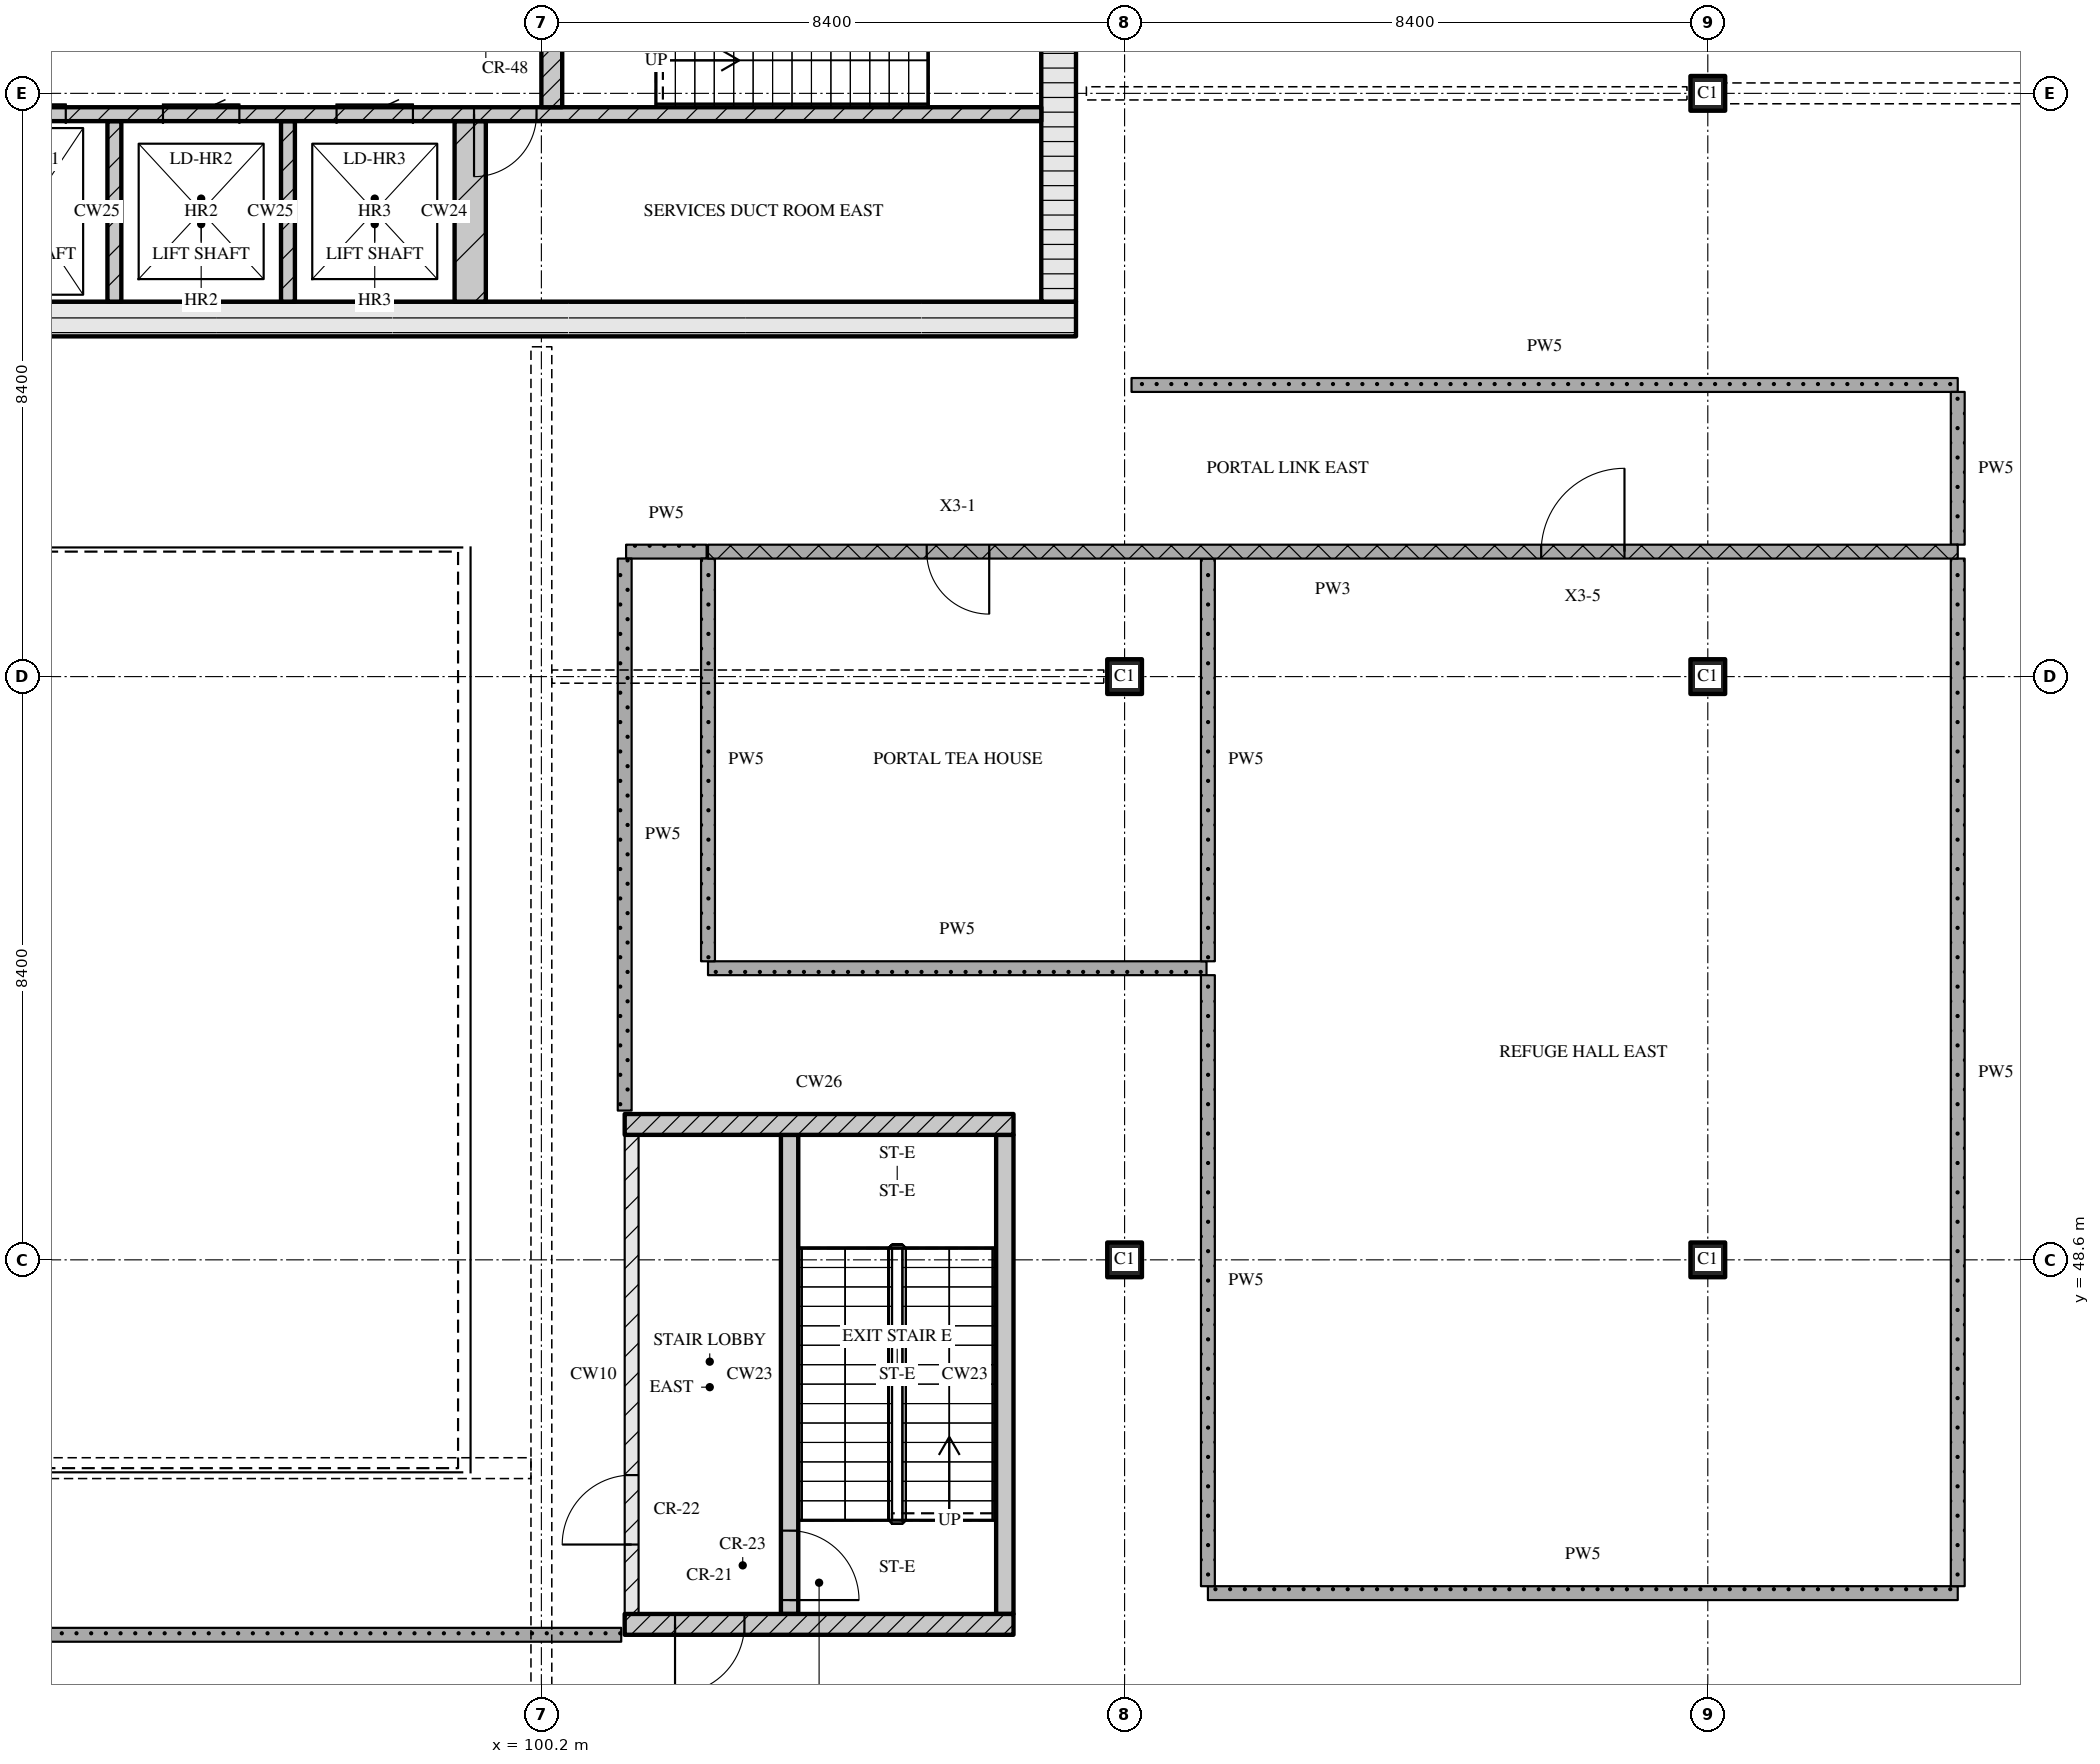
"""IFC4 building model, lengths in metres.
Left out: names, types, materials, properties, quantities, classifications, styles, units other than length and angle.
Written with IfcOpenShell. Run it as: python <this file> out.ifc"""

import sys

from ifc_helpers import new_model, si_unit, direction, frame, frame_2d, origin, origin_2d, place, context, subcontext, project, spatial, rectangle, extrude, element, fill, save


model = new_model("IFC4")
c1 = context("Model", 3, precision=1e-05, world=origin(), true_north=direction((0.0, 1.0)))
c2 = subcontext(c1, "Body", "Model", "MODEL_VIEW")
j1 = project(units=[si_unit("LENGTHUNIT", "METRE"), si_unit("PLANEANGLEUNIT", "RADIAN")], contexts=[c1])
p1 = place(None, origin())
s1 = spatial("IfcSite", under=j1, at=p1, CompositionType="ELEMENT")
p2 = place(p1, origin())
s2 = spatial("IfcBuilding", under=s1, at=p2, CompositionType="ELEMENT")
p3 = place(p2, frame((0.0, 0.0, 252.3)))
s3 = spatial("IfcBuildingStorey", under=s2, at=p3, CompositionType="ELEMENT", Elevation=252.3)
for number, where, z_axis, x_axis in (
    (1, (108.6, 48.6, 0.0), (0.0, 0.0, 1.0), (1.0, 0.0, 0.0)),
    (2, (108.6, 57.0, 0.0), (0.0, 0.0, 1.0), (1.0, 0.0, 0.0)),
    (3, (117.0, 48.6, 0.0), (0.0, 0.0, 1.0), (1.0, 0.0, 0.0)),
    (4, (117.0, 57.0, 0.0), (0.0, 0.0, 1.0), (1.0, 0.0, 0.0)),
    (5, (117.0, 65.4, 0.0), (0.0, 0.0, 1.0), (1.0, 0.0, 0.0)),
):
    element("IfcColumn", number, at=place(p3, frame(where, z_axis=z_axis, x_axis=x_axis)), inside=s3, PredefinedType="COLUMN", context=c2, shape_type="SweptSolid", body=[
        extrude(rectangle(XDim=0.5, YDim=0.5, at=origin_2d()), origin(), (0.0, 0.0, 1.0), 11.25),
    ])
p4 = place(p3, frame((67.3, 62.15, 0.0), z_axis=(0.0, 0.0, 1.0), x_axis=(1.0, 0.0, 0.0)))
e6 = element("IfcWall", 6, at=p4, inside=s3, PredefinedType="SOLIDWALL", context=c2, shape_type="SweptSolid", body=[
    extrude(rectangle(XDim=40.6, YDim=0.5, at=frame_2d((20.3, 0.0))), origin(), (0.0, 0.0, 1.0), 10.97),
])
p5 = place(p4, frame((20.65, 0.0, 0.0)))
e7 = element("IfcOpeningElement", 7, at=p5, cuts=e6, PredefinedType="OPENING", context=c2, shape_type="SweptSolid", body=[
    extrude(rectangle(XDim=1.8, YDim=2.1, at=frame_2d((0.9, 1.05))), frame((0.0, 0.26, 0.0), z_axis=(0.0, -1.0, 0.0), x_axis=(1.0, 0.0, 0.0)), (0.0, 0.0, 1.0), 0.52),
])
p6 = place(p3, frame((107.65, 62.4, 0.0), z_axis=(0.0, 0.0, 1.0), x_axis=(0.0, 1.0, 0.0)))
e8 = element("IfcWall", 8, at=p6, inside=s3, PredefinedType="SOLIDWALL", context=c2, shape_type="SweptSolid", body=[
    extrude(rectangle(XDim=12.0, YDim=0.5, at=frame_2d((6.0, 0.0))), origin(), (0.0, 0.0, 1.0), 10.97),
])
p7 = place(p6, frame((6.45, 0.0, 0.0)))
e9 = element("IfcOpeningElement", 9, at=p7, cuts=e8, PredefinedType="OPENING", context=c2, shape_type="SweptSolid", body=[
    extrude(rectangle(XDim=1.2, YDim=2.1, at=frame_2d((0.6, 1.05))), frame((0.0, 0.26, 0.0), z_axis=(0.0, -1.0, 0.0), x_axis=(1.0, 0.0, 0.0)), (0.0, 0.0, 1.0), 0.52),
])
for number, where, z_axis, x_axis in (
    (10, (94.05, 62.4, 0.0), (0.0, 0.0, 1.0), (0.0, 1.0, 0.0)),
    (11, (96.55, 62.4, 0.0), (0.0, 0.0, 1.0), (0.0, 1.0, 0.0)),
):
    element("IfcWall", number, at=place(p3, frame(where, z_axis=z_axis, x_axis=x_axis)), inside=s3, PredefinedType="SOLIDWALL", context=c2, shape_type="SweptSolid", body=[
        extrude(rectangle(XDim=2.6, YDim=0.2, at=frame_2d((1.3, 0.0))), origin(), (0.0, 0.0, 1.0), 10.97),
    ])
p8 = place(p3, frame((99.175, 62.4, 0.0), z_axis=(0.0, 0.0, 1.0), x_axis=(0.0, 1.0, 0.0)))
e12 = element("IfcWall", 12, at=p8, inside=s3, PredefinedType="SOLIDWALL", context=c2, shape_type="SweptSolid", body=[
    extrude(rectangle(XDim=2.6, YDim=0.45, at=frame_2d((1.3, 0.0))), origin(), (0.0, 0.0, 1.0), 10.97),
])
p9 = place(p3, frame((91.4, 65.1, 0.0), z_axis=(0.0, 0.0, 1.0), x_axis=(1.0, 0.0, 0.0)))
e13 = element("IfcWall", 13, at=p9, inside=s3, PredefinedType="SOLIDWALL", context=c2, shape_type="SweptSolid", body=[
    extrude(rectangle(XDim=16.0, YDim=0.2, at=frame_2d((8.0, 0.0))), origin(), (0.0, 0.0, 1.0), 10.97),
])
p10 = place(p9, frame((0.85, 0.0, 0.0)))
e14 = element("IfcOpeningElement", 14, at=p10, cuts=e13, PredefinedType="OPENING", context=c2, shape_type="SweptSolid", body=[
    extrude(rectangle(XDim=1.1, YDim=2.1, at=frame_2d((0.55, 1.05))), frame((0.0, 0.11, 0.0), z_axis=(0.0, -1.0, 0.0), x_axis=(1.0, 0.0, 0.0)), (0.0, 0.0, 1.0), 0.22),
])
p11 = place(p9, frame((3.35, 0.0, 0.0)))
e15 = element("IfcOpeningElement", 15, at=p11, cuts=e13, PredefinedType="OPENING", context=c2, shape_type="SweptSolid", body=[
    extrude(rectangle(XDim=1.1, YDim=2.1, at=frame_2d((0.55, 1.05))), frame((0.0, 0.11, 0.0), z_axis=(0.0, -1.0, 0.0), x_axis=(1.0, 0.0, 0.0)), (0.0, 0.0, 1.0), 0.22),
])
p12 = place(p9, frame((5.85, 0.0, 0.0)))
e16 = element("IfcOpeningElement", 16, at=p12, cuts=e13, PredefinedType="OPENING", context=c2, shape_type="SweptSolid", body=[
    extrude(rectangle(XDim=1.1, YDim=2.1, at=frame_2d((0.55, 1.05))), frame((0.0, 0.11, 0.0), z_axis=(0.0, -1.0, 0.0), x_axis=(1.0, 0.0, 0.0)), (0.0, 0.0, 1.0), 0.22),
])
p13 = place(p9, frame((7.83, 0.0, 0.0)))
e17 = element("IfcOpeningElement", 17, at=p13, cuts=e13, PredefinedType="OPENING", context=c2, shape_type="SweptSolid", body=[
    extrude(rectangle(XDim=0.9, YDim=2.1, at=frame_2d((0.45, 1.05))), frame((0.0, 0.11, 0.0), z_axis=(0.0, -1.0, 0.0), x_axis=(1.0, 0.0, 0.0)), (0.0, 0.0, 1.0), 0.22),
])
p14 = place(p3, frame((100.35, 65.2, 0.0), z_axis=(0.0, 0.0, 1.0), x_axis=(0.0, 1.0, 0.0)))
e18 = element("IfcWall", 18, at=p14, inside=s3, PredefinedType="SOLIDWALL", context=c2, shape_type="SweptSolid", body=[
    extrude(rectangle(XDim=2.85, YDim=0.3, at=frame_2d((1.425, 0.0))), origin(), (0.0, 0.0, 1.0), 10.97),
])
p15 = place(p3, frame((101.4, 43.35, 0.0), z_axis=(0.0, 0.0, 1.0), x_axis=(1.0, 0.0, 0.0)))
e19 = element("IfcWall", 19, at=p15, inside=s3, PredefinedType="SOLIDWALL", context=c2, shape_type="SweptSolid", body=[
    extrude(rectangle(XDim=5.6, YDim=0.3, at=frame_2d((2.8, 0.0))), origin(), (0.0, 0.0, 1.0), 10.97),
])
p16 = place(p15, frame((0.725, 0.0, 0.0)))
e20 = element("IfcOpeningElement", 20, at=p16, cuts=e19, PredefinedType="OPENING", context=c2, shape_type="SweptSolid", body=[
    extrude(rectangle(XDim=1.0, YDim=2.1, at=frame_2d((0.5, 1.05))), frame((0.0, 0.16, 0.0), z_axis=(0.0, -1.0, 0.0), x_axis=(1.0, 0.0, 0.0)), (0.0, 0.0, 1.0), 0.32),
])
p17 = place(p3, frame((101.5, 43.5, 0.0), z_axis=(0.0, 0.0, 1.0), x_axis=(0.0, 1.0, 0.0)))
e21 = element("IfcWall", 21, at=p17, inside=s3, PredefinedType="PARTITIONING", context=c2, shape_type="SweptSolid", body=[
    extrude(rectangle(XDim=6.9, YDim=0.2, at=frame_2d((3.45, 0.0))), origin(), (0.0, 0.0, 1.0), 10.97),
])
p18 = place(p17, frame((1.0, 0.0, 0.0)))
e22 = element("IfcOpeningElement", 22, at=p18, cuts=e21, PredefinedType="OPENING", context=c2, shape_type="SweptSolid", body=[
    extrude(rectangle(XDim=1.0, YDim=2.1, at=frame_2d((0.5, 1.05))), frame((0.0, 0.11, 0.0), z_axis=(0.0, -1.0, 0.0), x_axis=(1.0, 0.0, 0.0)), (0.0, 0.0, 1.0), 0.22),
])
p19 = place(p3, frame((103.775, 43.5, 0.0), z_axis=(0.0, 0.0, 1.0), x_axis=(0.0, 1.0, 0.0)))
e23 = element("IfcWall", 23, at=p19, inside=s3, PredefinedType="SOLIDWALL", context=c2, shape_type="SweptSolid", body=[
    extrude(rectangle(XDim=6.9, YDim=0.25, at=frame_2d((3.45, 0.0))), origin(), (0.0, 0.0, 1.0), 10.97),
])
p20 = place(p19, frame((0.2, 0.0, 0.0)))
e24 = element("IfcOpeningElement", 24, at=p20, cuts=e23, PredefinedType="OPENING", context=c2, shape_type="SweptSolid", body=[
    extrude(rectangle(XDim=1.0, YDim=2.1, at=frame_2d((0.5, 1.05))), frame((0.0, 0.135, 0.0), z_axis=(0.0, -1.0, 0.0), x_axis=(1.0, 0.0, 0.0)), (0.0, 0.0, 1.0), 0.27),
])
p21 = place(p3, frame((106.875, 43.5, 0.0), z_axis=(0.0, 0.0, 1.0), x_axis=(0.0, 1.0, 0.0)))
e25 = element("IfcWall", 25, at=p21, inside=s3, PredefinedType="SOLIDWALL", context=c2, shape_type="SweptSolid", body=[
    extrude(rectangle(XDim=6.9, YDim=0.25, at=frame_2d((3.45, 0.0))), origin(), (0.0, 0.0, 1.0), 10.97),
])
p22 = place(p3, frame((101.4, 50.55, 0.0), z_axis=(0.0, 0.0, 1.0), x_axis=(1.0, 0.0, 0.0)))
e26 = element("IfcWall", 26, at=p22, inside=s3, PredefinedType="SOLIDWALL", context=c2, shape_type="SweptSolid", body=[
    extrude(rectangle(XDim=5.6, YDim=0.3, at=frame_2d((2.8, 0.0))), origin(), (0.0, 0.0, 1.0), 10.97),
])
p23 = place(p3, frame((73.85, 43.2, 0.0), z_axis=(0.0, 0.0, 1.0), x_axis=(1.0, 0.0, 0.0)))
e27 = element("IfcWall", 27, at=p23, inside=s3, PredefinedType="PARTITIONING", context=c2, shape_type="SweptSolid", body=[
    extrude(rectangle(XDim=27.5, YDim=0.2, at=frame_2d((13.75, 0.0))), origin(), (0.0, 0.0, 1.0), 10.97),
])
p24 = place(p3, frame((109.8, 43.8, 0.0), z_axis=(0.0, 0.0, 1.0), x_axis=(1.0, 0.0, 0.0)))
e28 = element("IfcWall", 28, at=p24, inside=s3, PredefinedType="PARTITIONING", context=c2, shape_type="SweptSolid", body=[
    extrude(rectangle(XDim=10.8, YDim=0.2, at=frame_2d((5.4, 0.0))), origin(), (0.0, 0.0, 1.0), 10.97),
])
p25 = place(p3, frame((102.6, 52.8, 0.0), z_axis=(0.0, 0.0, 1.0), x_axis=(1.0, 0.0, 0.0)))
e29 = element("IfcWall", 29, at=p25, inside=s3, PredefinedType="PARTITIONING", context=c2, shape_type="SweptSolid", body=[
    extrude(rectangle(XDim=7.18, YDim=0.2, at=frame_2d((3.59, 0.0))), origin(), (0.0, 0.0, 1.0), 10.97),
])
p26 = place(p3, frame((120.6, 58.8, 0.0), z_axis=(0.0, 0.0, 1.0), x_axis=(-1.0, 0.0, 0.0)))
e30 = element("IfcWall", 30, at=p26, inside=s3, PredefinedType="PARTITIONING", context=c2, shape_type="SweptSolid", body=[
    extrude(rectangle(XDim=18.0, YDim=0.2, at=frame_2d((9.0, 0.0))), origin(), (0.0, 0.0, 1.0), 10.97),
])
p27 = place(p26, frame((4.8, 0.0, 0.0)))
e31 = element("IfcOpeningElement", 31, at=p27, cuts=e30, PredefinedType="OPENING", context=c2, shape_type="SweptSolid", body=[
    extrude(rectangle(XDim=1.2, YDim=2.1, at=frame_2d((0.6, 1.05))), frame((0.0, 0.11, 0.0), z_axis=(0.0, -1.0, 0.0), x_axis=(1.0, 0.0, 0.0)), (0.0, 0.0, 1.0), 0.22),
])
p28 = place(p26, frame((13.95, 0.0, 0.0)))
e32 = element("IfcOpeningElement", 32, at=p28, cuts=e30, PredefinedType="OPENING", context=c2, shape_type="SweptSolid", body=[
    extrude(rectangle(XDim=0.9, YDim=2.1, at=frame_2d((0.45, 1.05))), frame((0.0, 0.11, 0.0), z_axis=(0.0, -1.0, 0.0), x_axis=(1.0, 0.0, 0.0)), (0.0, 0.0, 1.0), 0.22),
])
p29 = place(p3, frame((101.42, 58.8, 0.0), z_axis=(0.0, 0.0, 1.0), x_axis=(1.0, 0.0, 0.0)))
e33 = element("IfcWall", 33, at=p29, inside=s3, PredefinedType="PARTITIONING", context=c2, shape_type="SweptSolid", body=[
    extrude(rectangle(XDim=1.16, YDim=0.2, at=frame_2d((0.58, 0.0))), origin(), (0.0, 0.0, 1.0), 10.97),
])
p30 = place(p3, frame((108.7, 61.2, 0.0), z_axis=(0.0, 0.0, 1.0), x_axis=(1.0, 0.0, 0.0)))
e34 = element("IfcWall", 34, at=p30, inside=s3, PredefinedType="PARTITIONING", context=c2, shape_type="SweptSolid", body=[
    extrude(rectangle(XDim=11.9, YDim=0.2, at=frame_2d((5.95, 0.0))), origin(), (0.0, 0.0, 1.0), 10.97),
])
p31 = place(p3, frame((101.4, 58.7, 0.0), z_axis=(0.0, 0.0, 1.0), x_axis=(0.0, -1.0, 0.0)))
e35 = element("IfcWall", 35, at=p31, inside=s3, PredefinedType="PARTITIONING", context=c2, shape_type="SweptSolid", body=[
    extrude(rectangle(XDim=7.95, YDim=0.2, at=frame_2d((3.975, 0.0))), origin(), (0.0, 0.0, 1.0), 10.97),
])
p32 = place(p3, frame((102.6, 58.7, 0.0), z_axis=(0.0, 0.0, 1.0), x_axis=(0.0, -1.0, 0.0)))
e36 = element("IfcWall", 36, at=p32, inside=s3, PredefinedType="PARTITIONING", context=c2, shape_type="SweptSolid", body=[
    extrude(rectangle(XDim=5.8, YDim=0.2, at=frame_2d((2.9, 0.0))), origin(), (0.0, 0.0, 1.0), 10.97),
])
p33 = place(p3, frame((109.8, 52.7, 0.0), z_axis=(0.0, 0.0, 1.0), x_axis=(0.0, -1.0, 0.0)))
e37 = element("IfcWall", 37, at=p33, inside=s3, PredefinedType="PARTITIONING", context=c2, shape_type="SweptSolid", body=[
    extrude(rectangle(XDim=8.8, YDim=0.2, at=frame_2d((4.4, 0.0))), origin(), (0.0, 0.0, 1.0), 10.97),
])
p34 = place(p3, frame((109.8, 58.7, 0.0), z_axis=(0.0, 0.0, 1.0), x_axis=(0.0, -1.0, 0.0)))
e38 = element("IfcWall", 38, at=p34, inside=s3, PredefinedType="PARTITIONING", context=c2, shape_type="SweptSolid", body=[
    extrude(rectangle(XDim=5.8, YDim=0.2, at=frame_2d((2.9, 0.0))), origin(), (0.0, 0.0, 1.0), 10.97),
])
p35 = place(p3, frame((120.6, 58.7, 0.0), z_axis=(0.0, 0.0, 1.0), x_axis=(0.0, -1.0, 0.0)))
e39 = element("IfcWall", 39, at=p35, inside=s3, PredefinedType="PARTITIONING", context=c2, shape_type="SweptSolid", body=[
    extrude(rectangle(XDim=14.8, YDim=0.2, at=frame_2d((7.4, 0.0))), origin(), (0.0, 0.0, 1.0), 10.97),
])
p36 = place(p3, frame((120.6, 61.1, 0.0), z_axis=(0.0, 0.0, 1.0), x_axis=(0.0, -1.0, 0.0)))
e40 = element("IfcWall", 40, at=p36, inside=s3, PredefinedType="PARTITIONING", context=c2, shape_type="SweptSolid", body=[
    extrude(rectangle(XDim=2.2, YDim=0.2, at=frame_2d((1.1, 0.0))), origin(), (0.0, 0.0, 1.0), 10.97),
])
p37 = place(p10, origin())
e41 = element("IfcDoor", 41, at=p37, inside=s3, OperationType="SLIDING_TO_LEFT", PredefinedType="DOOR", context=c2, shape_type="SweptSolid", body=[
    extrude(rectangle(XDim=1.1, YDim=2.1, at=frame_2d((0.55, 1.05))), frame((0.0, 0.025, 0.0), z_axis=(0.0, -1.0, 0.0), x_axis=(1.0, 0.0, 0.0)), (0.0, 0.0, 1.0), 0.05),
])
fill(e14, e41)
p38 = place(p11, origin())
e42 = element("IfcDoor", 42, at=p38, inside=s3, OperationType="SLIDING_TO_LEFT", PredefinedType="DOOR", context=c2, shape_type="SweptSolid", body=[
    extrude(rectangle(XDim=1.1, YDim=2.1, at=frame_2d((0.55, 1.05))), frame((0.0, 0.025, 0.0), z_axis=(0.0, -1.0, 0.0), x_axis=(1.0, 0.0, 0.0)), (0.0, 0.0, 1.0), 0.05),
])
fill(e15, e42)
p39 = place(p12, origin())
e43 = element("IfcDoor", 43, at=p39, inside=s3, OperationType="SLIDING_TO_LEFT", PredefinedType="DOOR", context=c2, shape_type="SweptSolid", body=[
    extrude(rectangle(XDim=1.1, YDim=2.1, at=frame_2d((0.55, 1.05))), frame((0.0, 0.025, 0.0), z_axis=(0.0, -1.0, 0.0), x_axis=(1.0, 0.0, 0.0)), (0.0, 0.0, 1.0), 0.05),
])
fill(e16, e43)
p40 = place(p13, origin())
e44 = element("IfcDoor", 44, at=p40, inside=s3, OperationType="SINGLE_SWING_RIGHT", PredefinedType="DOOR", context=c2, shape_type="SweptSolid", body=[
    extrude(rectangle(XDim=0.9, YDim=2.1, at=frame_2d((0.45, 1.05))), frame((0.0, 0.025, 0.0), z_axis=(0.0, -1.0, 0.0), x_axis=(1.0, 0.0, 0.0)), (0.0, 0.0, 1.0), 0.05),
])
fill(e17, e44)
p41 = place(p16, origin())
e45 = element("IfcDoor", 45, at=p41, inside=s3, OperationType="SINGLE_SWING_RIGHT", PredefinedType="DOOR", context=c2, shape_type="SweptSolid", body=[
    extrude(rectangle(XDim=1.0, YDim=2.1, at=frame_2d((0.5, 1.05))), frame((0.0, 0.025, 0.0), z_axis=(0.0, -1.0, 0.0), x_axis=(1.0, 0.0, 0.0)), (0.0, 0.0, 1.0), 0.05),
])
fill(e20, e45)
p42 = place(p20, origin())
e46 = element("IfcDoor", 46, at=p42, inside=s3, OperationType="SINGLE_SWING_RIGHT", PredefinedType="DOOR", context=c2, shape_type="SweptSolid", body=[
    extrude(rectangle(XDim=1.0, YDim=2.1, at=frame_2d((0.5, 1.05))), frame((0.0, 0.025, 0.0), z_axis=(0.0, -1.0, 0.0), x_axis=(1.0, 0.0, 0.0)), (0.0, 0.0, 1.0), 0.05),
])
fill(e24, e46)
p43 = place(p18, origin())
e47 = element("IfcDoor", 47, at=p43, inside=s3, OperationType="SINGLE_SWING_LEFT", PredefinedType="DOOR", context=c2, shape_type="SweptSolid", body=[
    extrude(rectangle(XDim=1.0, YDim=2.1, at=frame_2d((0.5, 1.05))), frame((0.0, 0.025, 0.0), z_axis=(0.0, -1.0, 0.0), x_axis=(1.0, 0.0, 0.0)), (0.0, 0.0, 1.0), 0.05),
])
fill(e22, e47)
p44 = place(p27, origin())
e48 = element("IfcDoor", 48, at=p44, inside=s3, OperationType="SINGLE_SWING_RIGHT", PredefinedType="DOOR", context=c2, shape_type="SweptSolid", body=[
    extrude(rectangle(XDim=1.2, YDim=2.1, at=frame_2d((0.6, 1.05))), frame((0.0, 0.025, 0.0), z_axis=(0.0, -1.0, 0.0), x_axis=(1.0, 0.0, 0.0)), (0.0, 0.0, 1.0), 0.05),
])
fill(e31, e48)
p45 = place(p28, origin())
e49 = element("IfcDoor", 49, at=p45, inside=s3, OperationType="SINGLE_SWING_LEFT", PredefinedType="DOOR", context=c2, shape_type="SweptSolid", body=[
    extrude(rectangle(XDim=0.9, YDim=2.1, at=frame_2d((0.45, 1.05))), frame((0.0, 0.025, 0.0), z_axis=(0.0, -1.0, 0.0), x_axis=(1.0, 0.0, 0.0)), (0.0, 0.0, 1.0), 0.05),
])
fill(e32, e49)
save(model, sys.argv[1])
